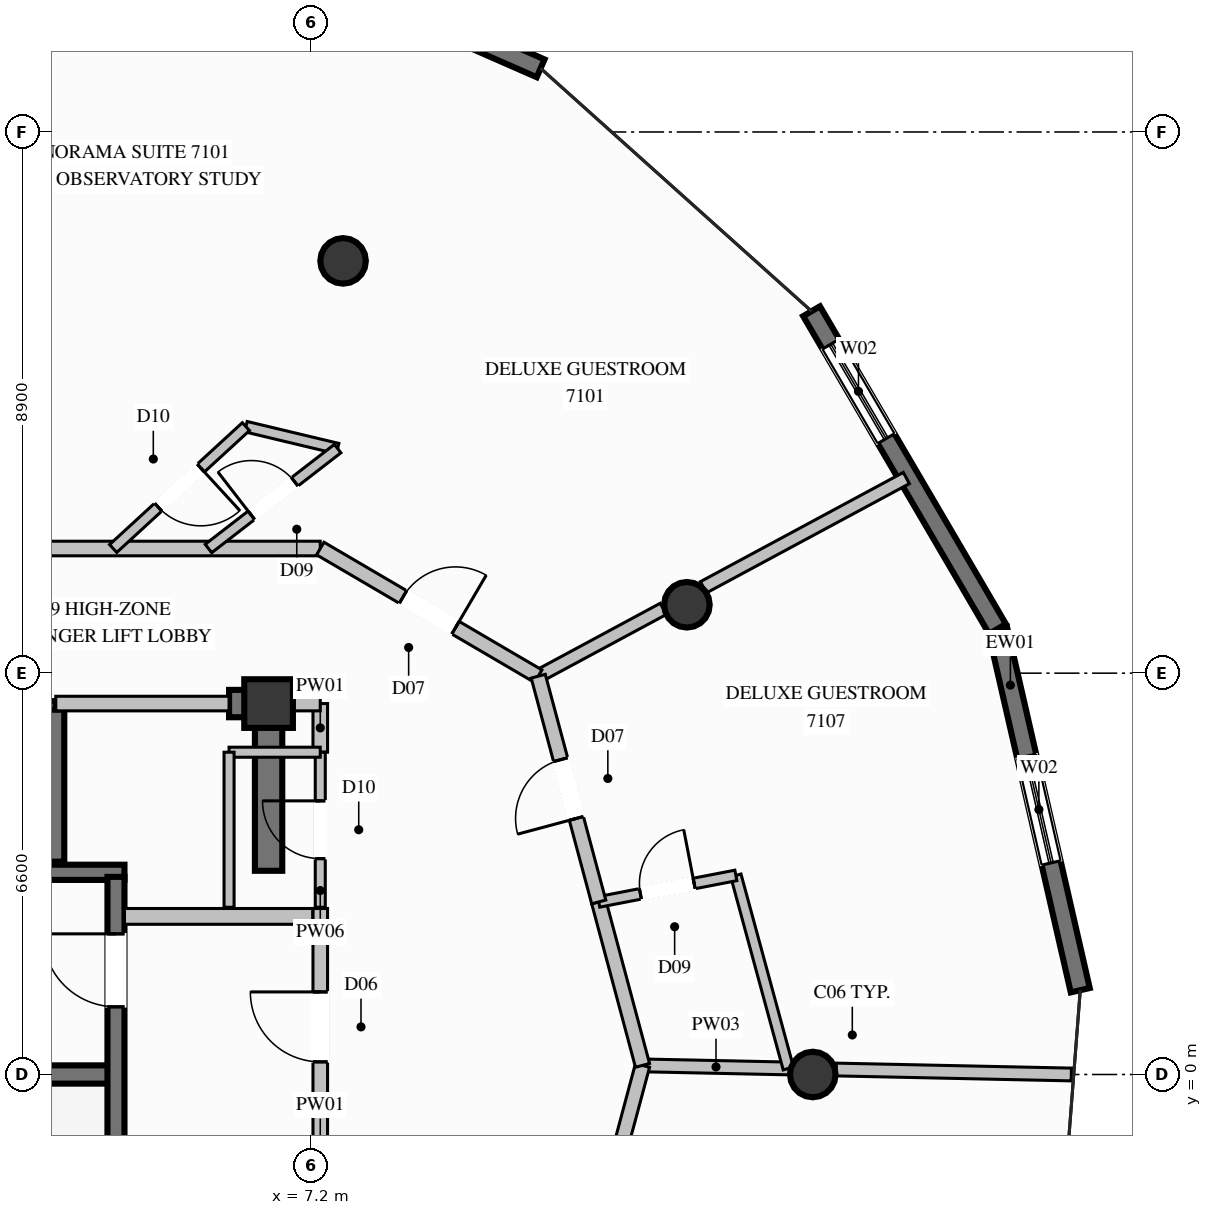
"""IFC4 building model, lengths in metres.
Left out: names, types, materials, properties, quantities, classifications, styles, units other than length and angle.
Written with IfcOpenShell. Run it as: python <this file> out.ifc"""

import sys

from ifc_helpers import new_model, si_unit, direction, frame, frame_2d, origin, origin_2d, place, context, subcontext, project, spatial, rectangle, circle, extrude, element, fill, save


model = new_model("IFC4")
c1 = context("Model", 3, precision=1e-05, world=origin(), true_north=direction((0.0, 1.0)))
c2 = subcontext(c1, "Body", "Model", "MODEL_VIEW")
j1 = project(units=[si_unit("LENGTHUNIT", "METRE"), si_unit("PLANEANGLEUNIT", "RADIAN")], contexts=[c1])
p1 = place(None, origin())
s1 = spatial("IfcSite", under=j1, at=p1, CompositionType="ELEMENT")
p2 = place(p1, origin())
s2 = spatial("IfcBuilding", under=s1, at=p2, CompositionType="ELEMENT")
p3 = place(p2, frame((0.0, 0.0, 266.8)))
s3 = spatial("IfcBuildingStorey", under=s2, at=p3, CompositionType="ELEMENT", Elevation=266.8)
p4 = place(p3, frame((6.5, 6.1, 0.0), z_axis=(0.0, 0.0, 1.0), x_axis=(1.0, 0.0, 0.0)))
e1 = element("IfcColumn", 1, at=p4, inside=s3, PredefinedType="COLUMN", context=c2, shape_type="SweptSolid", body=[
    extrude(rectangle(XDim=0.8, YDim=0.8, at=origin_2d()), origin(), (0.0, 0.0, 1.0), 3.8),
])
p5 = place(p3, frame((-3.99, 0.0, 0.0), z_axis=(0.0, 0.0, 1.0), x_axis=(1.0, 0.0, 0.0)))
e2 = element("IfcWall", 2, at=p5, inside=s3, PredefinedType="SHEAR", context=c2, shape_type="SweptSolid", body=[
    extrude(rectangle(XDim=7.98, YDim=0.3, at=frame_2d((3.99, 0.0))), origin(), (0.0, 0.0, 1.0), 3.8),
])
p6 = place(p3, frame((-4.13, 3.325, 0.0), z_axis=(0.0, 0.0, 1.0), x_axis=(1.0, 0.0, 0.0)))
e3 = element("IfcWall", 3, at=p6, inside=s3, PredefinedType="SOLIDWALL", context=c2, shape_type="SweptSolid", body=[
    extrude(rectangle(XDim=8.26, YDim=0.25, at=frame_2d((4.13, 0.0))), origin(), (0.0, 0.0, 1.0), 3.8),
])
p7 = place(p3, frame((5.85, 6.1, 0.0), z_axis=(0.0, 0.0, 1.0), x_axis=(1.0, 0.0, 0.0)))
e4 = element("IfcWall", 4, at=p7, inside=s3, PredefinedType="SHEAR", context=c2, shape_type="SweptSolid", body=[
    extrude(rectangle(XDim=0.425, YDim=0.45, at=frame_2d((0.212, 0.0))), origin(), (0.0, 0.0, 1.0), 3.8),
])
p8 = place(p3, frame((6.5, 3.35, 0.0), z_axis=(0.0, 0.0, 1.0), x_axis=(0.0, 1.0, 0.0)))
e5 = element("IfcWall", 5, at=p8, inside=s3, PredefinedType="SHEAR", context=c2, shape_type="SweptSolid", body=[
    extrude(rectangle(XDim=2.975, YDim=0.45, at=frame_2d((1.487, 0.0))), origin(), (0.0, 0.0, 1.0), 3.8),
])
for number, where, z_axis, x_axis in (
    (6, (15.45, 0.0, 0.0), (0.0, 0.0, 1.0), (1.0, 0.0, 0.0)),
    (7, (13.38, 7.725, 0.0), (0.0, 0.0, 1.0), (1.0, 0.0, 0.0)),
    (8, (7.725, 13.38, 0.0), (0.0, 0.0, 1.0), (1.0, 0.0, 0.0)),
):
    element("IfcColumn", number, at=place(p3, frame(where, z_axis=z_axis, x_axis=x_axis)), inside=s3, PredefinedType="COLUMN", context=c2, shape_type="SweptSolid", body=[
        extrude(circle(Radius=0.375, at=origin_2d()), origin(), (0.0, 0.0, 1.0), 3.8),
    ])
p9 = place(p3, frame((18.488, 7.328, 0.0), z_axis=(0.0, 0.0, 1.0), x_axis=(0.223282610096, -0.974753751482, 0.0)))
e9 = element("IfcWall", 9, at=p9, inside=s3, PredefinedType="SOLIDWALL", context=c2, shape_type="SweptSolid", body=[
    extrude(rectangle(XDim=6.096, YDim=0.32, at=frame_2d((3.048, 0.0))), origin(), (0.0, 0.0, 1.0), 3.57),
])
p10 = place(p9, frame((2.148, 0.0, 0.35)))
e10 = element("IfcOpeningElement", 10, at=p10, cuts=e9, PredefinedType="OPENING", context=c2, shape_type="SweptSolid", body=[
    extrude(rectangle(XDim=1.8, YDim=2.6, at=frame_2d((0.9, 1.3))), frame((0.0, 0.17, 0.0), z_axis=(0.0, -1.0, 0.0), x_axis=(1.0, 0.0, 0.0)), (0.0, 0.0, 1.0), 0.34),
])
p11 = place(p3, frame((15.43, 12.552, 0.0), z_axis=(0.0, 0.0, 1.0), x_axis=(0.505189458577, -0.863008465163, 0.0)))
e11 = element("IfcWall", 11, at=p11, inside=s3, PredefinedType="SOLIDWALL", context=c2, shape_type="SweptSolid", body=[
    extrude(rectangle(XDim=6.053, YDim=0.32, at=frame_2d((3.027, 0.0))), origin(), (0.0, 0.0, 1.0), 3.57),
])
p12 = place(p11, frame((0.627, 0.0, 0.35)))
e12 = element("IfcOpeningElement", 12, at=p12, cuts=e11, PredefinedType="OPENING", context=c2, shape_type="SweptSolid", body=[
    extrude(rectangle(XDim=1.8, YDim=2.6, at=frame_2d((0.9, 1.3))), frame((0.0, 0.17, 0.0), z_axis=(0.0, -1.0, 0.0), x_axis=(1.0, 0.0, 0.0)), (0.0, 0.0, 1.0), 0.34),
])
p13 = place(p3, frame((5.557, 18.923, 0.0), z_axis=(0.0, 0.0, 1.0), x_axis=(0.915788475135, -0.401660887828, 0.0)))
e13 = element("IfcWall", 13, at=p13, inside=s3, PredefinedType="SOLIDWALL", context=c2, shape_type="SweptSolid", body=[
    extrude(rectangle(XDim=5.915, YDim=0.32, at=frame_2d((2.958, 0.0))), origin(), (0.0, 0.0, 1.0), 3.57),
])
p14 = place(p13, frame((2.058, 0.0, 0.35)))
e14 = element("IfcOpeningElement", 14, at=p14, cuts=e13, PredefinedType="OPENING", context=c2, shape_type="SweptSolid", body=[
    extrude(rectangle(XDim=1.8, YDim=2.6, at=frame_2d((0.9, 1.3))), frame((0.0, 0.17, 0.0), z_axis=(0.0, -1.0, 0.0), x_axis=(1.0, 0.0, 0.0)), (0.0, 0.0, 1.0), 0.34),
])
p15 = place(p3, frame((3.0, 6.0, 0.0), z_axis=(0.0, 0.0, 1.0), x_axis=(-1.0, 0.0, 0.0)))
e15 = element("IfcWall", 15, at=p15, inside=s3, PredefinedType="SOLIDWALL", context=c2, shape_type="SweptSolid", body=[
    extrude(rectangle(XDim=2.2, YDim=0.28, at=frame_2d((1.1, 0.0))), origin(), (0.0, 0.0, 1.0), 3.57),
])
p16 = place(p3, frame((3.0, 3.5, 0.0), z_axis=(0.0, 0.0, 1.0), x_axis=(0.0, 1.0, 0.0)))
e16 = element("IfcWall", 16, at=p16, inside=s3, PredefinedType="SOLIDWALL", context=c2, shape_type="SweptSolid", body=[
    extrude(rectangle(XDim=2.5, YDim=0.28, at=frame_2d((1.25, 0.0))), origin(), (0.0, 0.0, 1.0), 3.57),
])
p17 = place(p3, frame((3.99, -2.21, 0.0), z_axis=(0.0, 0.0, 1.0), x_axis=(0.0, 1.0, 0.0)))
e17 = element("IfcWall", 17, at=p17, inside=s3, PredefinedType="SOLIDWALL", context=c2, shape_type="SweptSolid", body=[
    extrude(rectangle(XDim=5.46, YDim=0.28, at=frame_2d((2.73, 0.0))), origin(), (0.0, 0.0, 1.0), 3.57),
])
p18 = place(p17, frame((3.323, 0.0, 0.0)))
e18 = element("IfcOpeningElement", 18, at=p18, cuts=e17, PredefinedType="OPENING", context=c2, shape_type="SweptSolid", body=[
    extrude(rectangle(XDim=1.2, YDim=2.2, at=frame_2d((0.6, 1.1))), frame((0.0, 0.15, 0.0), z_axis=(0.0, -1.0, 0.0), x_axis=(1.0, 0.0, 0.0)), (0.0, 0.0, 1.0), 0.3),
])
p19 = place(p3, frame((7.35, -2.34, 0.0), z_axis=(0.0, 0.0, 1.0), x_axis=(0.0, 1.0, 0.0)))
e19 = element("IfcWall", 19, at=p19, inside=s3, PredefinedType="PARTITIONING", context=c2, shape_type="SweptSolid", body=[
    extrude(rectangle(XDim=5.07, YDim=0.24, at=frame_2d((2.535, 0.0))), origin(), (0.0, 0.0, 1.0), 2.655),
])
p20 = place(p19, frame((2.548, 0.0, 0.0)))
e20 = element("IfcOpeningElement", 20, at=p20, cuts=e19, PredefinedType="OPENING", context=c2, shape_type="SweptSolid", body=[
    extrude(rectangle(XDim=1.15, YDim=2.2, at=frame_2d((0.575, 1.1))), frame((0.0, 0.13, 0.0), z_axis=(0.0, -1.0, 0.0), x_axis=(1.0, 0.0, 0.0)), (0.0, 0.0, 1.0), 0.26),
])
p21 = place(p3, frame((4.13, 2.6, 0.0), z_axis=(0.0, 0.0, 1.0), x_axis=(1.0, 0.0, 0.0)))
e21 = element("IfcWall", 21, at=p21, inside=s3, PredefinedType="PARTITIONING", context=c2, shape_type="SweptSolid", body=[
    extrude(rectangle(XDim=3.095, YDim=0.26, at=frame_2d((1.548, 0.0))), origin(), (0.0, 0.0, 1.0), 3.57),
])
p22 = place(p3, frame((-5.75, 8.65, 0.0), z_axis=(0.0, 0.0, 1.0), x_axis=(1.0, 0.0, 0.0)))
e22 = element("IfcWall", 22, at=p22, inside=s3, PredefinedType="PARTITIONING", context=c2, shape_type="SweptSolid", body=[
    extrude(rectangle(XDim=13.1, YDim=0.24, at=frame_2d((6.55, 0.0))), origin(), (0.0, 0.0, 1.0), 3.57),
])
p23 = place(p3, frame((3.0, 6.1, 0.0), z_axis=(0.0, 0.0, 1.0), x_axis=(1.0, 0.0, 0.0)))
e23 = element("IfcWall", 23, at=p23, inside=s3, PredefinedType="PARTITIONING", context=c2, shape_type="SweptSolid", body=[
    extrude(rectangle(XDim=2.85, YDim=0.24, at=frame_2d((1.425, 0.0))), origin(), (0.0, 0.0, 1.0), 2.655),
])
p24 = place(p3, frame((7.35, 5.3, 0.0), z_axis=(0.0, 0.0, 1.0), x_axis=(0.0, 1.0, 0.0)))
e24 = element("IfcWall", 24, at=p24, inside=s3, PredefinedType="PARTITIONING", context=c2, shape_type="SweptSolid", body=[
    extrude(rectangle(XDim=0.8, YDim=0.24, at=frame_2d((0.4, 0.0))), origin(), (0.0, 0.0, 1.0), 2.655),
])
p25 = place(p3, frame((6.5, 6.1, 0.0), z_axis=(0.0, 0.0, 1.0), x_axis=(1.0, 0.0, 0.0)))
e25 = element("IfcWall", 25, at=p25, inside=s3, PredefinedType="PARTITIONING", context=c2, shape_type="SweptSolid", body=[
    extrude(rectangle(XDim=0.85, YDim=0.24, at=frame_2d((0.425, 0.0))), origin(), (0.0, 0.0, 1.0), 3.085),
])
p26 = place(p3, frame((7.35, 2.75, 0.0), z_axis=(0.0, 0.0, 1.0), x_axis=(0.0, 1.0, 0.0)))
e26 = element("IfcWall", 26, at=p26, inside=s3, PredefinedType="PARTITIONING", context=c2, shape_type="SweptSolid", body=[
    extrude(rectangle(XDim=2.55, YDim=0.165, at=frame_2d((1.275, 0.0))), origin(), (0.0, 0.0, 1.0), 3.57),
])
p27 = place(p26, frame((0.8, 0.0, 0.0)))
e27 = element("IfcOpeningElement", 27, at=p27, cuts=e26, PredefinedType="OPENING", context=c2, shape_type="SweptSolid", body=[
    extrude(rectangle(XDim=0.95, YDim=2.1, at=frame_2d((0.475, 1.05))), frame((0.0, 0.093, 0.0), z_axis=(0.0, -1.0, 0.0), x_axis=(1.0, 0.0, 0.0)), (0.0, 0.0, 1.0), 0.185),
])
p28 = place(p3, frame((7.35, 5.3, 0.0), z_axis=(0.0, 0.0, 1.0), x_axis=(-1.0, 0.0, 0.0)))
e28 = element("IfcWall", 28, at=p28, inside=s3, PredefinedType="PARTITIONING", context=c2, shape_type="SweptSolid", body=[
    extrude(rectangle(XDim=1.5, YDim=0.165, at=frame_2d((0.75, 0.0))), origin(), (0.0, 0.0, 1.0), 2.655),
])
p29 = place(p3, frame((5.85, 5.3, 0.0), z_axis=(0.0, 0.0, 1.0), x_axis=(0.0, -1.0, 0.0)))
e29 = element("IfcWall", 29, at=p29, inside=s3, PredefinedType="PARTITIONING", context=c2, shape_type="SweptSolid", body=[
    extrude(rectangle(XDim=2.55, YDim=0.165, at=frame_2d((1.275, 0.0))), origin(), (0.0, 0.0, 1.0), 2.655),
])
p30 = place(p3, frame((12.65, 0.15, 0.0), z_axis=(0.0, 0.0, 1.0), x_axis=(0.999779360872, -0.02100546536, 0.0)))
e30 = element("IfcWall", 30, at=p30, inside=s3, PredefinedType="PARTITIONING", context=c2, shape_type="SweptSolid", body=[
    extrude(rectangle(XDim=2.417, YDim=0.21, at=frame_2d((1.209, 0.0))), origin(), (0.0, 0.0, 1.0), 3.57),
])
p31 = place(p3, frame((15.836, 0.082, 0.0), z_axis=(0.0, 0.0, 1.0), x_axis=(0.999774956848, -0.021214043922, 0.0)))
e31 = element("IfcWall", 31, at=p31, inside=s3, PredefinedType="PARTITIONING", context=c2, shape_type="SweptSolid", body=[
    extrude(rectangle(XDim=3.867, YDim=0.21, at=frame_2d((1.934, 0.0))), origin(), (0.0, 0.0, 1.0), 3.57),
])
p32 = place(p3, frame((10.935, 6.55, 0.0), z_axis=(0.0, 0.0, 1.0), x_axis=(0.8804878863, 0.474068647011, 0.0)))
e32 = element("IfcWall", 32, at=p32, inside=s3, PredefinedType="PARTITIONING", context=c2, shape_type="SweptSolid", body=[
    extrude(rectangle(XDim=2.335, YDim=0.21, at=frame_2d((1.167, 0.0))), origin(), (0.0, 0.0, 1.0), 3.085),
])
p33 = place(p3, frame((13.651, 8.012, 0.0), z_axis=(0.0, 0.0, 1.0), x_axis=(0.880508317837, 0.47403069755, 0.0)))
e33 = element("IfcWall", 33, at=p33, inside=s3, PredefinedType="PARTITIONING", context=c2, shape_type="SweptSolid", body=[
    extrude(rectangle(XDim=3.791, YDim=0.21, at=frame_2d((1.896, 0.0))), origin(), (0.0, 0.0, 1.0), 3.57),
])
p34 = place(p3, frame((6.127, 10.654, 0.0), z_axis=(0.0, 0.0, 1.0), x_axis=(0.972545612194, -0.23271233788, 0.0)))
e34 = element("IfcWall", 34, at=p34, inside=s3, PredefinedType="PLUMBINGWALL", context=c2, shape_type="SweptSolid", body=[
    extrude(rectangle(XDim=1.552, YDim=0.175, at=frame_2d((0.776, 0.0))), origin(), (0.0, 0.0, 1.0), 3.57),
])
p35 = place(p3, frame((6.127, 10.654, 0.0), z_axis=(0.0, 0.0, 1.0), x_axis=(-0.736616996747, -0.676310136035, 0.0)))
e35 = element("IfcWall", 35, at=p35, inside=s3, PredefinedType="PLUMBINGWALL", context=c2, shape_type="SweptSolid", body=[
    extrude(rectangle(XDim=2.963, YDim=0.175, at=frame_2d((1.482, 0.0))), origin(), (0.0, 0.0, 1.0), 3.57),
])
p36 = place(p35, frame((1.007, 0.0, 0.0)))
e36 = element("IfcOpeningElement", 36, at=p36, cuts=e35, PredefinedType="OPENING", context=c2, shape_type="SweptSolid", body=[
    extrude(rectangle(XDim=0.95, YDim=2.1, at=frame_2d((0.475, 1.05))), frame((0.0, 0.098, 0.0), z_axis=(0.0, -1.0, 0.0), x_axis=(1.0, 0.0, 0.0)), (0.0, 0.0, 1.0), 0.195),
])
p37 = place(p3, frame((5.511, 8.65, 0.0), z_axis=(0.0, 0.0, 1.0), x_axis=(0.791101070426, 0.611685455419, 0.0)))
e37 = element("IfcWall", 37, at=p37, inside=s3, PredefinedType="PLUMBINGWALL", context=c2, shape_type="SweptSolid", body=[
    extrude(rectangle(XDim=2.686, YDim=0.175, at=frame_2d((1.343, 0.0))), origin(), (0.0, 0.0, 1.0), 3.57),
])
p38 = place(p37, frame((0.893, 0.0, 0.0)))
e38 = element("IfcOpeningElement", 38, at=p38, cuts=e37, PredefinedType="OPENING", context=c2, shape_type="SweptSolid", body=[
    extrude(rectangle(XDim=0.9, YDim=2.1, at=frame_2d((0.45, 1.05))), frame((0.0, 0.098, 0.0), z_axis=(0.0, -1.0, 0.0), x_axis=(1.0, 0.0, 0.0)), (0.0, 0.0, 1.0), 0.195),
])
p39 = place(p3, frame((7.35, 8.65, 0.0), z_axis=(0.0, 0.0, 1.0), x_axis=(0.862873842462, -0.505419362505, 0.0)))
e39 = element("IfcWall", 39, at=p39, inside=s3, PredefinedType="PARTITIONING", context=c2, shape_type="SweptSolid", body=[
    extrude(rectangle(XDim=4.155, YDim=0.24, at=frame_2d((2.077, 0.0))), origin(), (0.0, 0.0, 1.0), 3.57),
])
p40 = place(p39, frame((1.577, 0.0, 0.0)))
e40 = element("IfcOpeningElement", 40, at=p40, cuts=e39, PredefinedType="OPENING", context=c2, shape_type="SweptSolid", body=[
    extrude(rectangle(XDim=1.0, YDim=2.2, at=frame_2d((0.5, 1.1))), frame((0.0, 0.13, 0.0), z_axis=(0.0, -1.0, 0.0), x_axis=(1.0, 0.0, 0.0)), (0.0, 0.0, 1.0), 0.26),
])
p41 = place(p3, frame((11.655, -3.562, 0.0), z_axis=(0.0, 0.0, 1.0), x_axis=(0.258884274469, 0.965908345772, 0.0)))
e41 = element("IfcWall", 41, at=p41, inside=s3, PredefinedType="PARTITIONING", context=c2, shape_type="SweptSolid", body=[
    extrude(rectangle(XDim=3.843, YDim=0.24, at=frame_2d((1.921, 0.0))), origin(), (0.0, 0.0, 1.0), 3.57),
])
p42 = place(p41, frame((1.422, 0.0, 0.0)))
e42 = element("IfcOpeningElement", 42, at=p42, cuts=e41, PredefinedType="OPENING", context=c2, shape_type="SweptSolid", body=[
    extrude(rectangle(XDim=1.0, YDim=2.2, at=frame_2d((0.5, 1.1))), frame((0.0, 0.13, 0.0), z_axis=(0.0, -1.0, 0.0), x_axis=(1.0, 0.0, 0.0)), (0.0, 0.0, 1.0), 0.26),
])
p43 = place(p3, frame((12.65, 0.15, 0.0), z_axis=(0.0, 0.0, 1.0), x_axis=(-0.258727314432, 0.96595040078, 0.0)))
e43 = element("IfcWall", 43, at=p43, inside=s3, PredefinedType="PARTITIONING", context=c2, shape_type="SweptSolid", body=[
    extrude(rectangle(XDim=2.783, YDim=0.24, at=frame_2d((1.391, 0.0))), origin(), (0.0, 0.0, 1.0), 3.57),
])
p44 = place(p3, frame((15.048, 0.099, 0.0), z_axis=(0.0, 0.0, 1.0), x_axis=(-0.262319881737, 0.964980973722, 0.0)))
e44 = element("IfcWall", 44, at=p44, inside=s3, PredefinedType="PLUMBINGWALL", context=c2, shape_type="SweptSolid", body=[
    extrude(rectangle(XDim=3.29, YDim=0.175, at=frame_2d((1.645, 0.0))), origin(), (0.0, 0.0, 1.0), 3.137),
])
p45 = place(p3, frame((11.93, 2.838, 0.0), z_axis=(0.0, 0.0, 1.0), x_axis=(0.981815654593, 0.189836825712, 0.0)))
e45 = element("IfcWall", 45, at=p45, inside=s3, PredefinedType="PLUMBINGWALL", context=c2, shape_type="SweptSolid", body=[
    extrude(rectangle(XDim=2.297, YDim=0.175, at=frame_2d((1.148, 0.0))), origin(), (0.0, 0.0, 1.0), 3.57),
])
p46 = place(p45, frame((0.698, 0.0, 0.0)))
e46 = element("IfcOpeningElement", 46, at=p46, cuts=e45, PredefinedType="OPENING", context=c2, shape_type="SweptSolid", body=[
    extrude(rectangle(XDim=0.9, YDim=2.1, at=frame_2d((0.45, 1.05))), frame((0.0, 0.098, 0.0), z_axis=(0.0, -1.0, 0.0), x_axis=(1.0, 0.0, 0.0)), (0.0, 0.0, 1.0), 0.195),
])
p47 = place(p3, frame((11.93, 2.838, 0.0), z_axis=(0.0, 0.0, 1.0), x_axis=(-0.258868389222, 0.965912603221, 0.0)))
e47 = element("IfcWall", 47, at=p47, inside=s3, PredefinedType="PARTITIONING", context=c2, shape_type="SweptSolid", body=[
    extrude(rectangle(XDim=3.843, YDim=0.24, at=frame_2d((1.922, 0.0))), origin(), (0.0, 0.0, 1.0), 3.57),
])
p48 = place(p47, frame((1.422, 0.0, 0.0)))
e48 = element("IfcOpeningElement", 48, at=p48, cuts=e47, PredefinedType="OPENING", context=c2, shape_type="SweptSolid", body=[
    extrude(rectangle(XDim=1.0, YDim=2.2, at=frame_2d((0.5, 1.1))), frame((0.0, 0.13, 0.0), z_axis=(0.0, -1.0, 0.0), x_axis=(1.0, 0.0, 0.0)), (0.0, 0.0, 1.0), 0.26),
])
p49 = place(p10, origin())
e49 = element("IfcWindow", 49, at=p49, inside=s3, PartitioningType="SINGLE_PANEL", PredefinedType="WINDOW", context=c2, shape_type="SweptSolid", body=[
    extrude(rectangle(XDim=1.8, YDim=2.6, at=frame_2d((0.9, 1.3))), frame((0.0, 0.03, 0.0), z_axis=(0.0, -1.0, 0.0), x_axis=(1.0, 0.0, 0.0)), (0.0, 0.0, 1.0), 0.06),
])
fill(e10, e49)
p50 = place(p12, origin())
e50 = element("IfcWindow", 50, at=p50, inside=s3, PartitioningType="SINGLE_PANEL", PredefinedType="WINDOW", context=c2, shape_type="SweptSolid", body=[
    extrude(rectangle(XDim=1.8, YDim=2.6, at=frame_2d((0.9, 1.3))), frame((0.0, 0.03, 0.0), z_axis=(0.0, -1.0, 0.0), x_axis=(1.0, 0.0, 0.0)), (0.0, 0.0, 1.0), 0.06),
])
fill(e12, e50)
p51 = place(p18, origin())
e51 = element("IfcDoor", 51, at=p51, inside=s3, OperationType="SINGLE_SWING_RIGHT", PredefinedType="DOOR", context=c2, shape_type="SweptSolid", body=[
    extrude(rectangle(XDim=1.2, YDim=2.2, at=frame_2d((0.6, 1.1))), frame((0.0, 0.025, 0.0), z_axis=(0.0, -1.0, 0.0), x_axis=(1.0, 0.0, 0.0)), (0.0, 0.0, 1.0), 0.05),
])
fill(e18, e51)
p52 = place(p20, origin())
e52 = element("IfcDoor", 52, at=p52, inside=s3, OperationType="SINGLE_SWING_RIGHT", PredefinedType="DOOR", context=c2, shape_type="SweptSolid", body=[
    extrude(rectangle(XDim=1.15, YDim=2.2, at=frame_2d((0.575, 1.1))), frame((0.0, 0.025, 0.0), z_axis=(0.0, -1.0, 0.0), x_axis=(1.0, 0.0, 0.0)), (0.0, 0.0, 1.0), 0.05),
])
fill(e20, e52)
p53 = place(p27, origin())
e53 = element("IfcDoor", 53, at=p53, inside=s3, OperationType="SINGLE_SWING_RIGHT", PredefinedType="DOOR", context=c2, shape_type="SweptSolid", body=[
    extrude(rectangle(XDim=0.95, YDim=2.1, at=frame_2d((0.475, 1.05))), frame((0.0, 0.025, 0.0), z_axis=(0.0, -1.0, 0.0), x_axis=(1.0, 0.0, 0.0)), (0.0, 0.0, 1.0), 0.05),
])
fill(e27, e53)
p54 = place(p38, origin())
e54 = element("IfcDoor", 54, at=p54, inside=s3, OperationType="SINGLE_SWING_LEFT", PredefinedType="DOOR", context=c2, shape_type="SweptSolid", body=[
    extrude(rectangle(XDim=0.9, YDim=2.1, at=frame_2d((0.45, 1.05))), frame((0.0, 0.025, 0.0), z_axis=(0.0, -1.0, 0.0), x_axis=(1.0, 0.0, 0.0)), (0.0, 0.0, 1.0), 0.05),
])
fill(e38, e54)
p55 = place(p40, origin())
e55 = element("IfcDoor", 55, at=p55, inside=s3, OperationType="SINGLE_SWING_RIGHT", PredefinedType="DOOR", context=c2, shape_type="SweptSolid", body=[
    extrude(rectangle(XDim=1.0, YDim=2.2, at=frame_2d((0.5, 1.1))), frame((0.0, 0.025, 0.0), z_axis=(0.0, -1.0, 0.0), x_axis=(1.0, 0.0, 0.0)), (0.0, 0.0, 1.0), 0.05),
])
fill(e40, e55)
p56 = place(p36, origin())
e56 = element("IfcDoor", 56, at=p56, inside=s3, OperationType="SINGLE_SWING_LEFT", PredefinedType="DOOR", context=c2, shape_type="SweptSolid", body=[
    extrude(rectangle(XDim=0.95, YDim=2.1, at=frame_2d((0.475, 1.05))), frame((0.0, 0.025, 0.0), z_axis=(0.0, -1.0, 0.0), x_axis=(1.0, 0.0, 0.0)), (0.0, 0.0, 1.0), 0.05),
])
fill(e36, e56)
p57 = place(p46, origin())
e57 = element("IfcDoor", 57, at=p57, inside=s3, OperationType="SINGLE_SWING_RIGHT", PredefinedType="DOOR", context=c2, shape_type="SweptSolid", body=[
    extrude(rectangle(XDim=0.9, YDim=2.1, at=frame_2d((0.45, 1.05))), frame((0.0, 0.025, 0.0), z_axis=(0.0, -1.0, 0.0), x_axis=(1.0, 0.0, 0.0)), (0.0, 0.0, 1.0), 0.05),
])
fill(e46, e57)
p58 = place(p48, origin())
e58 = element("IfcDoor", 58, at=p58, inside=s3, OperationType="SINGLE_SWING_LEFT", PredefinedType="DOOR", context=c2, shape_type="SweptSolid", body=[
    extrude(rectangle(XDim=1.0, YDim=2.2, at=frame_2d((0.5, 1.1))), frame((0.0, 0.025, 0.0), z_axis=(0.0, -1.0, 0.0), x_axis=(1.0, 0.0, 0.0)), (0.0, 0.0, 1.0), 0.05),
])
fill(e48, e58)
save(model, sys.argv[1])
